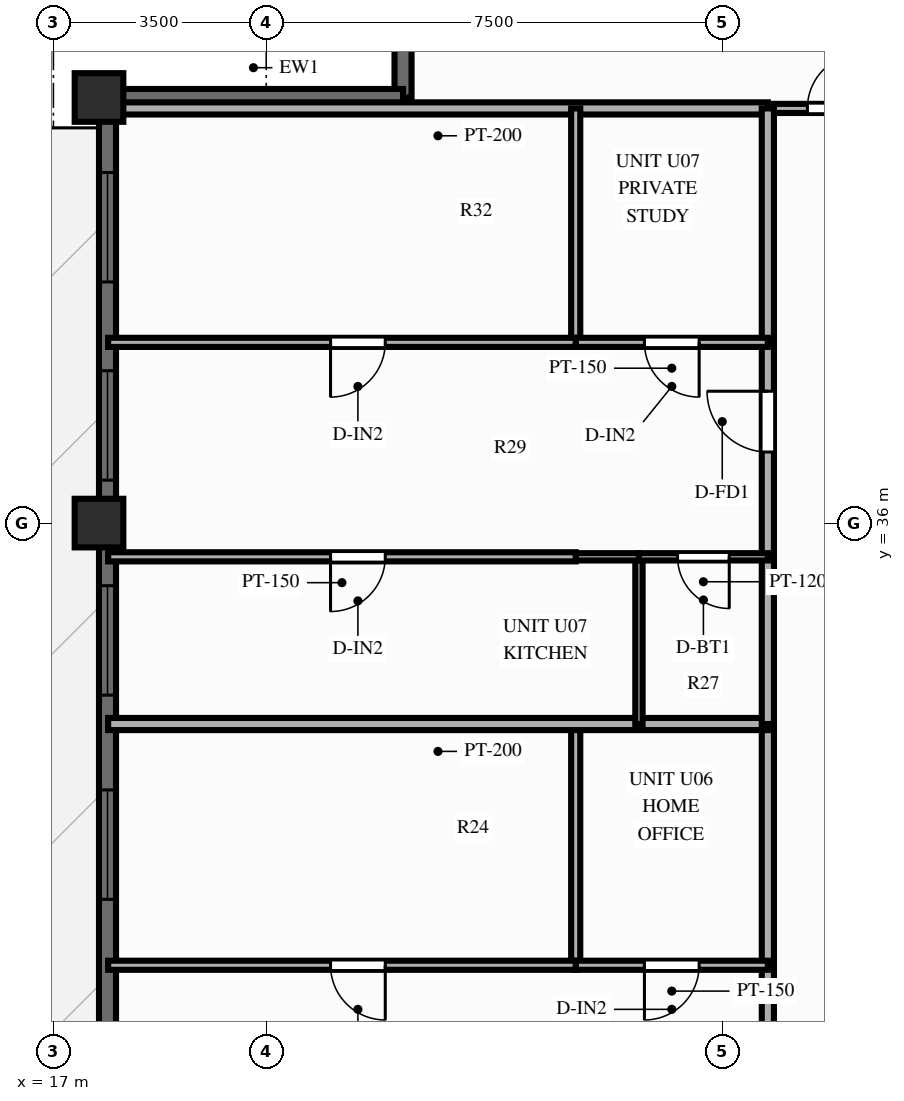
"""IFC4 building model, lengths in metres.
Left out: names, types, materials, properties, quantities, classifications, styles, units other than length and angle.
Written with IfcOpenShell. Run it as: python <this file> out.ifc"""

import sys

from ifc_helpers import new_model, si_unit, direction, frame, frame_2d, origin, origin_2d, place, context, subcontext, project, spatial, rectangle, extrude, source, transform, mapped, element, fill, save


model = new_model("IFC4")
c1 = context("Model", 3, precision=1e-05, world=origin(), true_north=direction((0.0, 1.0)))
c2 = subcontext(c1, "Body", "Model", "MODEL_VIEW")
j1 = project(units=[si_unit("LENGTHUNIT", "METRE"), si_unit("PLANEANGLEUNIT", "RADIAN")], contexts=[c1])
p1 = place(None, origin())
s1 = spatial("IfcSite", under=j1, at=p1, CompositionType="ELEMENT")
p2 = place(p1, origin())
s2 = spatial("IfcBuilding", under=s1, at=p2, CompositionType="ELEMENT")
p3 = place(p2, frame((0.0, 0.0, 182.8)))
s3 = spatial("IfcBuildingStorey", under=s2, at=p3, CompositionType="ELEMENT", Elevation=182.8)
m1 = source(origin(), c2, "Body", "SweptSolid", [
    extrude(rectangle(XDim=0.8, YDim=0.8, at=origin_2d()), origin(), (0.0, 0.0, 1.0), 3.9),
])
for number, where, z_axis, x_axis in (
    (1, (17.75, 43.0, 0.0), (0.0, 0.0, 1.0), (1.0, 0.0, 0.0)),
    (2, (17.75, 36.0, 0.0), (0.0, 0.0, 1.0), (1.0, 0.0, 0.0)),
):
    element("IfcColumn", number, at=place(p3, frame(where, z_axis=z_axis, x_axis=x_axis)), inside=s3, PredefinedType="COLUMN", context=c2, shape_type="MappedRepresentation", body=[
        mapped(m1, transform((0.0, 0.0, 0.0), scale=1.0)),
    ])
p4 = place(p3, frame((17.89, 11.0, 0.0), z_axis=(0.0, 0.0, 1.0), x_axis=(0.0, 1.0, 0.0)))
e3 = element("IfcWall", 3, at=p4, inside=s3, PredefinedType="SOLIDWALL", context=c2, shape_type="SweptSolid", body=[
    extrude(rectangle(XDim=32.0, YDim=0.28, at=frame_2d((16.0, 0.0))), origin(), (0.0, 0.0, 1.0), 2.79),
])
p5 = place(p4, frame((0.685, 0.0, 0.85)))
e4 = element("IfcOpeningElement", 4, at=p5, cuts=e3, PredefinedType="OPENING", context=c2, shape_type="SweptSolid", body=[
    extrude(rectangle(XDim=1.8, YDim=1.65, at=frame_2d((0.9, 0.825))), frame((0.0, 0.152, 0.0), z_axis=(0.0, -1.0, 0.0), x_axis=(1.0, 0.0, 0.0)), (0.0, 0.0, 1.0), 0.304),
])
p6 = place(p4, frame((3.945, 0.0, 0.85)))
e5 = element("IfcOpeningElement", 5, at=p6, cuts=e3, PredefinedType="OPENING", context=c2, shape_type="SweptSolid", body=[
    extrude(rectangle(XDim=1.8, YDim=1.65, at=frame_2d((0.9, 0.825))), frame((0.0, 0.152, 0.0), z_axis=(0.0, -1.0, 0.0), x_axis=(1.0, 0.0, 0.0)), (0.0, 0.0, 1.0), 0.304),
])
p7 = place(p4, frame((8.367, 0.0, 0.85)))
e6 = element("IfcOpeningElement", 6, at=p7, cuts=e3, PredefinedType="OPENING", context=c2, shape_type="SweptSolid", body=[
    extrude(rectangle(XDim=1.8, YDim=1.65, at=frame_2d((0.9, 0.825))), frame((0.0, 0.152, 0.0), z_axis=(0.0, -1.0, 0.0), x_axis=(1.0, 0.0, 0.0)), (0.0, 0.0, 1.0), 0.304),
])
p8 = place(p4, frame((11.729, 0.0, 0.85)))
e7 = element("IfcOpeningElement", 7, at=p8, cuts=e3, PredefinedType="OPENING", context=c2, shape_type="SweptSolid", body=[
    extrude(rectangle(XDim=1.8, YDim=1.65, at=frame_2d((0.9, 0.825))), frame((0.0, 0.152, 0.0), z_axis=(0.0, -1.0, 0.0), x_axis=(1.0, 0.0, 0.0)), (0.0, 0.0, 1.0), 0.304),
])
p9 = place(p4, frame((15.066, 0.0, 0.0)))
e8 = element("IfcOpeningElement", 8, at=p9, cuts=e3, PredefinedType="OPENING", context=c2, shape_type="SweptSolid", body=[
    extrude(rectangle(XDim=1.6, YDim=2.15, at=frame_2d((0.8, 1.075))), frame((0.0, 0.152, 0.0), z_axis=(0.0, -1.0, 0.0), x_axis=(1.0, 0.0, 0.0)), (0.0, 0.0, 1.0), 0.304),
])
p10 = place(p4, frame((18.811, 0.0, 0.85)))
e9 = element("IfcOpeningElement", 9, at=p10, cuts=e3, PredefinedType="OPENING", context=c2, shape_type="SweptSolid", body=[
    extrude(rectangle(XDim=1.8, YDim=1.65, at=frame_2d((0.9, 0.825))), frame((0.0, 0.152, 0.0), z_axis=(0.0, -1.0, 0.0), x_axis=(1.0, 0.0, 0.0)), (0.0, 0.0, 1.0), 0.304),
])
p11 = place(p4, frame((22.17, 0.0, 0.85)))
e10 = element("IfcOpeningElement", 10, at=p11, cuts=e3, PredefinedType="OPENING", context=c2, shape_type="SweptSolid", body=[
    extrude(rectangle(XDim=1.8, YDim=1.65, at=frame_2d((0.9, 0.825))), frame((0.0, 0.152, 0.0), z_axis=(0.0, -1.0, 0.0), x_axis=(1.0, 0.0, 0.0)), (0.0, 0.0, 1.0), 0.304),
])
p12 = place(p4, frame((25.706, 0.0, 0.85)))
e11 = element("IfcOpeningElement", 11, at=p12, cuts=e3, PredefinedType="OPENING", context=c2, shape_type="SweptSolid", body=[
    extrude(rectangle(XDim=1.8, YDim=1.65, at=frame_2d((0.9, 0.825))), frame((0.0, 0.152, 0.0), z_axis=(0.0, -1.0, 0.0), x_axis=(1.0, 0.0, 0.0)), (0.0, 0.0, 1.0), 0.304),
])
p13 = place(p4, frame((28.966, 0.0, 0.85)))
e12 = element("IfcOpeningElement", 12, at=p13, cuts=e3, PredefinedType="OPENING", context=c2, shape_type="SweptSolid", body=[
    extrude(rectangle(XDim=1.8, YDim=1.65, at=frame_2d((0.9, 0.825))), frame((0.0, 0.152, 0.0), z_axis=(0.0, -1.0, 0.0), x_axis=(1.0, 0.0, 0.0)), (0.0, 0.0, 1.0), 0.304),
])
for number, where, z_axis, x_axis in (
    (13, (22.75, 43.0, 0.0), (0.0, 0.0, 1.0), (0.0, 1.0, 0.0)),
    (14, (17.83, 43.0, 0.0), (0.0, 0.0, 1.0), (1.0, 0.0, 0.0)),
):
    element("IfcWall", number, at=place(p3, frame(where, z_axis=z_axis, x_axis=x_axis)), inside=s3, PredefinedType="SOLIDWALL", context=c2, shape_type="SweptSolid", body=[
        extrude(rectangle(XDim=4.92, YDim=0.28, at=frame_2d((2.46, 0.0))), origin(), (0.0, 0.0, 1.0), 2.79),
    ])
p14 = place(p3, frame((28.85, 42.82, 0.0), z_axis=(0.0, 0.0, 1.0), x_axis=(1.0, 0.0, 0.0)))
e15 = element("IfcWall", 15, at=p14, inside=s3, PredefinedType="PARTITIONING", context=c2, shape_type="SweptSolid", body=[
    extrude(rectangle(XDim=2.33, YDim=0.15, at=frame_2d((1.165, 0.0))), origin(), (0.0, 0.0, 1.0), 3.69),
])
p15 = place(p14, frame((0.55, 0.0, 0.0)))
e16 = element("IfcOpeningElement", 16, at=p15, cuts=e15, PredefinedType="OPENING", context=c2, shape_type="SweptSolid", body=[
    extrude(rectangle(XDim=0.9, YDim=2.1, at=frame_2d((0.45, 1.05))), frame((0.0, 0.087, 0.0), z_axis=(0.0, -1.0, 0.0), x_axis=(1.0, 0.0, 0.0)), (0.0, 0.0, 1.0), 0.174),
])
p16 = place(p3, frame((28.75, 42.82, 0.0), z_axis=(0.0, 0.0, 1.0), x_axis=(-1.0, 0.0, 0.0)))
e17 = element("IfcWall", 17, at=p16, inside=s3, PredefinedType="PARTITIONING", context=c2, shape_type="SweptSolid", body=[
    extrude(rectangle(XDim=10.85, YDim=0.2, at=frame_2d((5.425, 0.0))), origin(), (0.0, 0.0, 1.0), 3.69),
])
p17 = place(p3, frame((28.75, 25.004, 0.0), z_axis=(0.0, 0.0, 1.0), x_axis=(0.0, 1.0, 0.0)))
e18 = element("IfcWall", 18, at=p17, inside=s3, PredefinedType="PARTITIONING", context=c2, shape_type="SweptSolid", body=[
    extrude(rectangle(XDim=3.724, YDim=0.2, at=frame_2d((1.862, 0.0))), origin(), (0.0, 0.0, 1.0), 3.69),
])
p18 = place(p17, frame((1.362, 0.0, 0.0)))
e19 = element("IfcOpeningElement", 19, at=p18, cuts=e18, PredefinedType="OPENING", context=c2, shape_type="SweptSolid", body=[
    extrude(rectangle(XDim=1.0, YDim=2.15, at=frame_2d((0.5, 1.075))), frame((0.0, 0.112, 0.0), z_axis=(0.0, -1.0, 0.0), x_axis=(1.0, 0.0, 0.0)), (0.0, 0.0, 1.0), 0.224),
])
p19 = place(p3, frame((28.75, 28.728, 0.0), z_axis=(0.0, 0.0, 1.0), x_axis=(0.0, 1.0, 0.0)))
e20 = element("IfcWall", 20, at=p19, inside=s3, PredefinedType="PARTITIONING", context=c2, shape_type="SweptSolid", body=[
    extrude(rectangle(XDim=3.968, YDim=0.2, at=frame_2d((1.984, 0.0))), origin(), (0.0, 0.0, 1.0), 3.69),
])
p20 = place(p3, frame((25.59, 28.728, 0.0), z_axis=(0.0, 0.0, 1.0), x_axis=(0.0, 1.0, 0.0)))
e21 = element("IfcWall", 21, at=p20, inside=s3, PredefinedType="PARTITIONING", context=c2, shape_type="SweptSolid", body=[
    extrude(rectangle(XDim=3.968, YDim=0.15, at=frame_2d((1.984, 0.0))), origin(), (0.0, 0.0, 1.0), 3.69),
])
p21 = place(p3, frame((28.75, 28.728, 0.0), z_axis=(0.0, 0.0, 1.0), x_axis=(-1.0, 0.0, 0.0)))
e22 = element("IfcWall", 22, at=p21, inside=s3, PredefinedType="PARTITIONING", context=c2, shape_type="SweptSolid", body=[
    extrude(rectangle(XDim=3.16, YDim=0.15, at=frame_2d((1.58, 0.0))), origin(), (0.0, 0.0, 1.0), 3.69),
])
p22 = place(p21, frame((1.13, 0.0, 0.0)))
e23 = element("IfcOpeningElement", 23, at=p22, cuts=e22, PredefinedType="OPENING", context=c2, shape_type="SweptSolid", body=[
    extrude(rectangle(XDim=0.9, YDim=2.1, at=frame_2d((0.45, 1.05))), frame((0.0, 0.087, 0.0), z_axis=(0.0, -1.0, 0.0), x_axis=(1.0, 0.0, 0.0)), (0.0, 0.0, 1.0), 0.174),
])
p23 = place(p3, frame((25.59, 28.728, 0.0), z_axis=(0.0, 0.0, 1.0), x_axis=(-1.0, 0.0, 0.0)))
e24 = element("IfcWall", 24, at=p23, inside=s3, PredefinedType="PARTITIONING", context=c2, shape_type="SweptSolid", body=[
    extrude(rectangle(XDim=7.69, YDim=0.15, at=frame_2d((3.845, 0.0))), origin(), (0.0, 0.0, 1.0), 3.69),
])
p24 = place(p23, frame((3.132, 0.0, 0.0)))
e25 = element("IfcOpeningElement", 25, at=p24, cuts=e24, PredefinedType="OPENING", context=c2, shape_type="SweptSolid", body=[
    extrude(rectangle(XDim=0.9, YDim=2.1, at=frame_2d((0.45, 1.05))), frame((0.0, 0.087, 0.0), z_axis=(0.0, -1.0, 0.0), x_axis=(1.0, 0.0, 0.0)), (0.0, 0.0, 1.0), 0.174),
])
p25 = place(p3, frame((28.75, 32.695, 0.0), z_axis=(0.0, 0.0, 1.0), x_axis=(-1.0, 0.0, 0.0)))
e26 = element("IfcWall", 26, at=p25, inside=s3, PredefinedType="PARTITIONING", context=c2, shape_type="SweptSolid", body=[
    extrude(rectangle(XDim=10.85, YDim=0.2, at=frame_2d((5.425, 0.0))), origin(), (0.0, 0.0, 1.0), 3.69),
])
p26 = place(p3, frame((28.75, 32.695, 0.0), z_axis=(0.0, 0.0, 1.0), x_axis=(0.0, 1.0, 0.0)))
e27 = element("IfcWall", 27, at=p26, inside=s3, PredefinedType="PARTITIONING", context=c2, shape_type="SweptSolid", body=[
    extrude(rectangle(XDim=2.75, YDim=0.2, at=frame_2d((1.375, 0.0))), origin(), (0.0, 0.0, 1.0), 3.69),
])
p27 = place(p3, frame((28.75, 35.445, 0.0), z_axis=(0.0, 0.0, 1.0), x_axis=(0.0, 1.0, 0.0)))
e28 = element("IfcWall", 28, at=p27, inside=s3, PredefinedType="PARTITIONING", context=c2, shape_type="SweptSolid", body=[
    extrude(rectangle(XDim=3.527, YDim=0.2, at=frame_2d((1.764, 0.0))), origin(), (0.0, 0.0, 1.0), 3.69),
])
p28 = place(p27, frame((1.724, 0.0, 0.0)))
e29 = element("IfcOpeningElement", 29, at=p28, cuts=e28, PredefinedType="OPENING", context=c2, shape_type="SweptSolid", body=[
    extrude(rectangle(XDim=1.0, YDim=2.15, at=frame_2d((0.5, 1.075))), frame((0.0, 0.112, 0.0), z_axis=(0.0, -1.0, 0.0), x_axis=(1.0, 0.0, 0.0)), (0.0, 0.0, 1.0), 0.224),
])
p29 = place(p3, frame((28.75, 38.973, 0.0), z_axis=(0.0, 0.0, 1.0), x_axis=(0.0, 1.0, 0.0)))
e30 = element("IfcWall", 30, at=p29, inside=s3, PredefinedType="PARTITIONING", context=c2, shape_type="SweptSolid", body=[
    extrude(rectangle(XDim=3.847, YDim=0.2, at=frame_2d((1.924, 0.0))), origin(), (0.0, 0.0, 1.0), 3.69),
])
p30 = place(p3, frame((26.63, 32.695, 0.0), z_axis=(0.0, 0.0, 1.0), x_axis=(0.0, 1.0, 0.0)))
e31 = element("IfcWall", 31, at=p30, inside=s3, PredefinedType="PARTITIONING", context=c2, shape_type="SweptSolid", body=[
    extrude(rectangle(XDim=2.75, YDim=0.12, at=frame_2d((1.375, 0.0))), origin(), (0.0, 0.0, 1.0), 3.69),
])
p31 = place(p3, frame((25.59, 38.973, 0.0), z_axis=(0.0, 0.0, 1.0), x_axis=(0.0, 1.0, 0.0)))
e32 = element("IfcWall", 32, at=p31, inside=s3, PredefinedType="PARTITIONING", context=c2, shape_type="SweptSolid", body=[
    extrude(rectangle(XDim=3.847, YDim=0.15, at=frame_2d((1.924, 0.0))), origin(), (0.0, 0.0, 1.0), 3.69),
])
p32 = place(p3, frame((28.75, 35.445, 0.0), z_axis=(0.0, 0.0, 1.0), x_axis=(-1.0, 0.0, 0.0)))
e33 = element("IfcWall", 33, at=p32, inside=s3, PredefinedType="PARTITIONING", context=c2, shape_type="SweptSolid", body=[
    extrude(rectangle(XDim=2.12, YDim=0.12, at=frame_2d((1.06, 0.0))), origin(), (0.0, 0.0, 1.0), 3.69),
])
p33 = place(p32, frame((0.635, 0.0, 0.0)))
e34 = element("IfcOpeningElement", 34, at=p33, cuts=e33, PredefinedType="OPENING", context=c2, shape_type="SweptSolid", body=[
    extrude(rectangle(XDim=0.85, YDim=2.05, at=frame_2d((0.425, 1.025))), frame((0.0, 0.072, 0.0), z_axis=(0.0, -1.0, 0.0), x_axis=(1.0, 0.0, 0.0)), (0.0, 0.0, 1.0), 0.144),
])
p34 = place(p3, frame((26.63, 35.445, 0.0), z_axis=(0.0, 0.0, 1.0), x_axis=(-1.0, 0.0, 0.0)))
e35 = element("IfcWall", 35, at=p34, inside=s3, PredefinedType="PARTITIONING", context=c2, shape_type="SweptSolid", body=[
    extrude(rectangle(XDim=1.04, YDim=0.12, at=frame_2d((0.52, 0.0))), origin(), (0.0, 0.0, 1.0), 3.69),
])
p35 = place(p3, frame((25.59, 35.445, 0.0), z_axis=(0.0, 0.0, 1.0), x_axis=(-1.0, 0.0, 0.0)))
e36 = element("IfcWall", 36, at=p35, inside=s3, PredefinedType="PARTITIONING", context=c2, shape_type="SweptSolid", body=[
    extrude(rectangle(XDim=7.69, YDim=0.15, at=frame_2d((3.845, 0.0))), origin(), (0.0, 0.0, 1.0), 3.69),
])
p36 = place(p35, frame((3.132, 0.0, 0.0)))
e37 = element("IfcOpeningElement", 37, at=p36, cuts=e36, PredefinedType="OPENING", context=c2, shape_type="SweptSolid", body=[
    extrude(rectangle(XDim=0.9, YDim=2.1, at=frame_2d((0.45, 1.05))), frame((0.0, 0.087, 0.0), z_axis=(0.0, -1.0, 0.0), x_axis=(1.0, 0.0, 0.0)), (0.0, 0.0, 1.0), 0.174),
])
p37 = place(p3, frame((28.75, 38.973, 0.0), z_axis=(0.0, 0.0, 1.0), x_axis=(-1.0, 0.0, 0.0)))
e38 = element("IfcWall", 38, at=p37, inside=s3, PredefinedType="PARTITIONING", context=c2, shape_type="SweptSolid", body=[
    extrude(rectangle(XDim=3.16, YDim=0.15, at=frame_2d((1.58, 0.0))), origin(), (0.0, 0.0, 1.0), 3.69),
])
p38 = place(p37, frame((1.13, 0.0, 0.0)))
e39 = element("IfcOpeningElement", 39, at=p38, cuts=e38, PredefinedType="OPENING", context=c2, shape_type="SweptSolid", body=[
    extrude(rectangle(XDim=0.9, YDim=2.1, at=frame_2d((0.45, 1.05))), frame((0.0, 0.087, 0.0), z_axis=(0.0, -1.0, 0.0), x_axis=(1.0, 0.0, 0.0)), (0.0, 0.0, 1.0), 0.174),
])
p39 = place(p3, frame((25.59, 38.973, 0.0), z_axis=(0.0, 0.0, 1.0), x_axis=(-1.0, 0.0, 0.0)))
e40 = element("IfcWall", 40, at=p39, inside=s3, PredefinedType="PARTITIONING", context=c2, shape_type="SweptSolid", body=[
    extrude(rectangle(XDim=7.69, YDim=0.15, at=frame_2d((3.845, 0.0))), origin(), (0.0, 0.0, 1.0), 3.69),
])
p40 = place(p39, frame((3.132, 0.0, 0.0)))
e41 = element("IfcOpeningElement", 41, at=p40, cuts=e40, PredefinedType="OPENING", context=c2, shape_type="SweptSolid", body=[
    extrude(rectangle(XDim=0.9, YDim=2.1, at=frame_2d((0.45, 1.05))), frame((0.0, 0.087, 0.0), z_axis=(0.0, -1.0, 0.0), x_axis=(1.0, 0.0, 0.0)), (0.0, 0.0, 1.0), 0.174),
])
m2 = source(origin(), c2, "Body", "SweptSolid", [
    extrude(rectangle(XDim=1.8, YDim=1.65, at=frame_2d((0.9, 0.825))), frame((0.0, 0.03, 0.0), z_axis=(0.0, -1.0, 0.0), x_axis=(1.0, 0.0, 0.0)), (0.0, 0.0, 1.0), 0.06),
])
p41 = place(p10, origin())
e42 = element("IfcWindow", 42, at=p41, inside=s3, PartitioningType="SINGLE_PANEL", PredefinedType="WINDOW", context=c2, shape_type="MappedRepresentation", body=[
    mapped(m2, transform((0.0, 0.0, 0.0), scale=1.0)),
])
fill(e9, e42)
p42 = place(p11, origin())
e43 = element("IfcWindow", 43, at=p42, inside=s3, PartitioningType="SINGLE_PANEL", PredefinedType="WINDOW", context=c2, shape_type="MappedRepresentation", body=[
    mapped(m2, transform((0.0, 0.0, 0.0), scale=1.0)),
])
fill(e10, e43)
p43 = place(p12, origin())
e44 = element("IfcWindow", 44, at=p43, inside=s3, PartitioningType="SINGLE_PANEL", PredefinedType="WINDOW", context=c2, shape_type="MappedRepresentation", body=[
    mapped(m2, transform((0.0, 0.0, 0.0), scale=1.0)),
])
fill(e11, e44)
p44 = place(p13, origin())
e45 = element("IfcWindow", 45, at=p44, inside=s3, PartitioningType="SINGLE_PANEL", PredefinedType="WINDOW", context=c2, shape_type="MappedRepresentation", body=[
    mapped(m2, transform((0.0, 0.0, 0.0), scale=1.0)),
])
fill(e12, e45)
m3 = source(origin(), c2, "Body", "SweptSolid", [
    extrude(rectangle(XDim=0.9, YDim=2.1, at=frame_2d((0.45, 1.05))), frame((0.0, 0.025, 0.0), z_axis=(0.0, -1.0, 0.0), x_axis=(1.0, 0.0, 0.0)), (0.0, 0.0, 1.0), 0.05),
])
p45 = place(p15, origin())
e46 = element("IfcDoor", 46, at=p45, inside=s3, OperationType="SINGLE_SWING_RIGHT", PredefinedType="DOOR", context=c2, shape_type="MappedRepresentation", body=[
    mapped(m3, transform((0.0, 0.0, 0.0), scale=1.0)),
])
fill(e16, e46)
p46 = place(p22, origin())
e47 = element("IfcDoor", 47, at=p46, inside=s3, OperationType="SINGLE_SWING_RIGHT", PredefinedType="DOOR", context=c2, shape_type="MappedRepresentation", body=[
    mapped(m3, transform((0.0, 0.0, 0.0), scale=1.0)),
])
fill(e23, e47)
p47 = place(p24, origin())
e48 = element("IfcDoor", 48, at=p47, inside=s3, OperationType="SINGLE_SWING_LEFT", PredefinedType="DOOR", context=c2, shape_type="MappedRepresentation", body=[
    mapped(m3, transform((0.0, 0.0, 0.0), scale=1.0)),
])
fill(e25, e48)
m4 = source(origin(), c2, "Body", "SweptSolid", [
    extrude(rectangle(XDim=1.0, YDim=2.15, at=frame_2d((0.5, 1.075))), frame((0.0, 0.025, 0.0), z_axis=(0.0, -1.0, 0.0), x_axis=(1.0, 0.0, 0.0)), (0.0, 0.0, 1.0), 0.05),
])
p48 = place(p28, origin())
e49 = element("IfcDoor", 49, at=p48, inside=s3, OperationType="SINGLE_SWING_RIGHT", PredefinedType="DOOR", context=c2, shape_type="MappedRepresentation", body=[
    mapped(m4, transform((0.0, 0.0, 0.0), scale=1.0)),
])
fill(e29, e49)
m5 = source(origin(), c2, "Body", "SweptSolid", [
    extrude(rectangle(XDim=0.85, YDim=2.05, at=frame_2d((0.425, 1.025))), frame((0.0, 0.025, 0.0), z_axis=(0.0, -1.0, 0.0), x_axis=(1.0, 0.0, 0.0)), (0.0, 0.0, 1.0), 0.05),
])
p49 = place(p33, origin())
e50 = element("IfcDoor", 50, at=p49, inside=s3, OperationType="SINGLE_SWING_LEFT", PredefinedType="DOOR", context=c2, shape_type="MappedRepresentation", body=[
    mapped(m5, transform((0.0, 0.0, 0.0), scale=1.0)),
])
fill(e34, e50)
p50 = place(p36, origin())
e51 = element("IfcDoor", 51, at=p50, inside=s3, OperationType="SINGLE_SWING_RIGHT", PredefinedType="DOOR", context=c2, shape_type="MappedRepresentation", body=[
    mapped(m3, transform((0.0, 0.0, 0.0), scale=1.0)),
])
fill(e37, e51)
p51 = place(p38, origin())
e52 = element("IfcDoor", 52, at=p51, inside=s3, OperationType="SINGLE_SWING_LEFT", PredefinedType="DOOR", context=c2, shape_type="MappedRepresentation", body=[
    mapped(m3, transform((0.0, 0.0, 0.0), scale=1.0)),
])
fill(e39, e52)
p52 = place(p40, origin())
e53 = element("IfcDoor", 53, at=p52, inside=s3, OperationType="SINGLE_SWING_RIGHT", PredefinedType="DOOR", context=c2, shape_type="MappedRepresentation", body=[
    mapped(m3, transform((0.0, 0.0, 0.0), scale=1.0)),
])
fill(e41, e53)
save(model, sys.argv[1])
